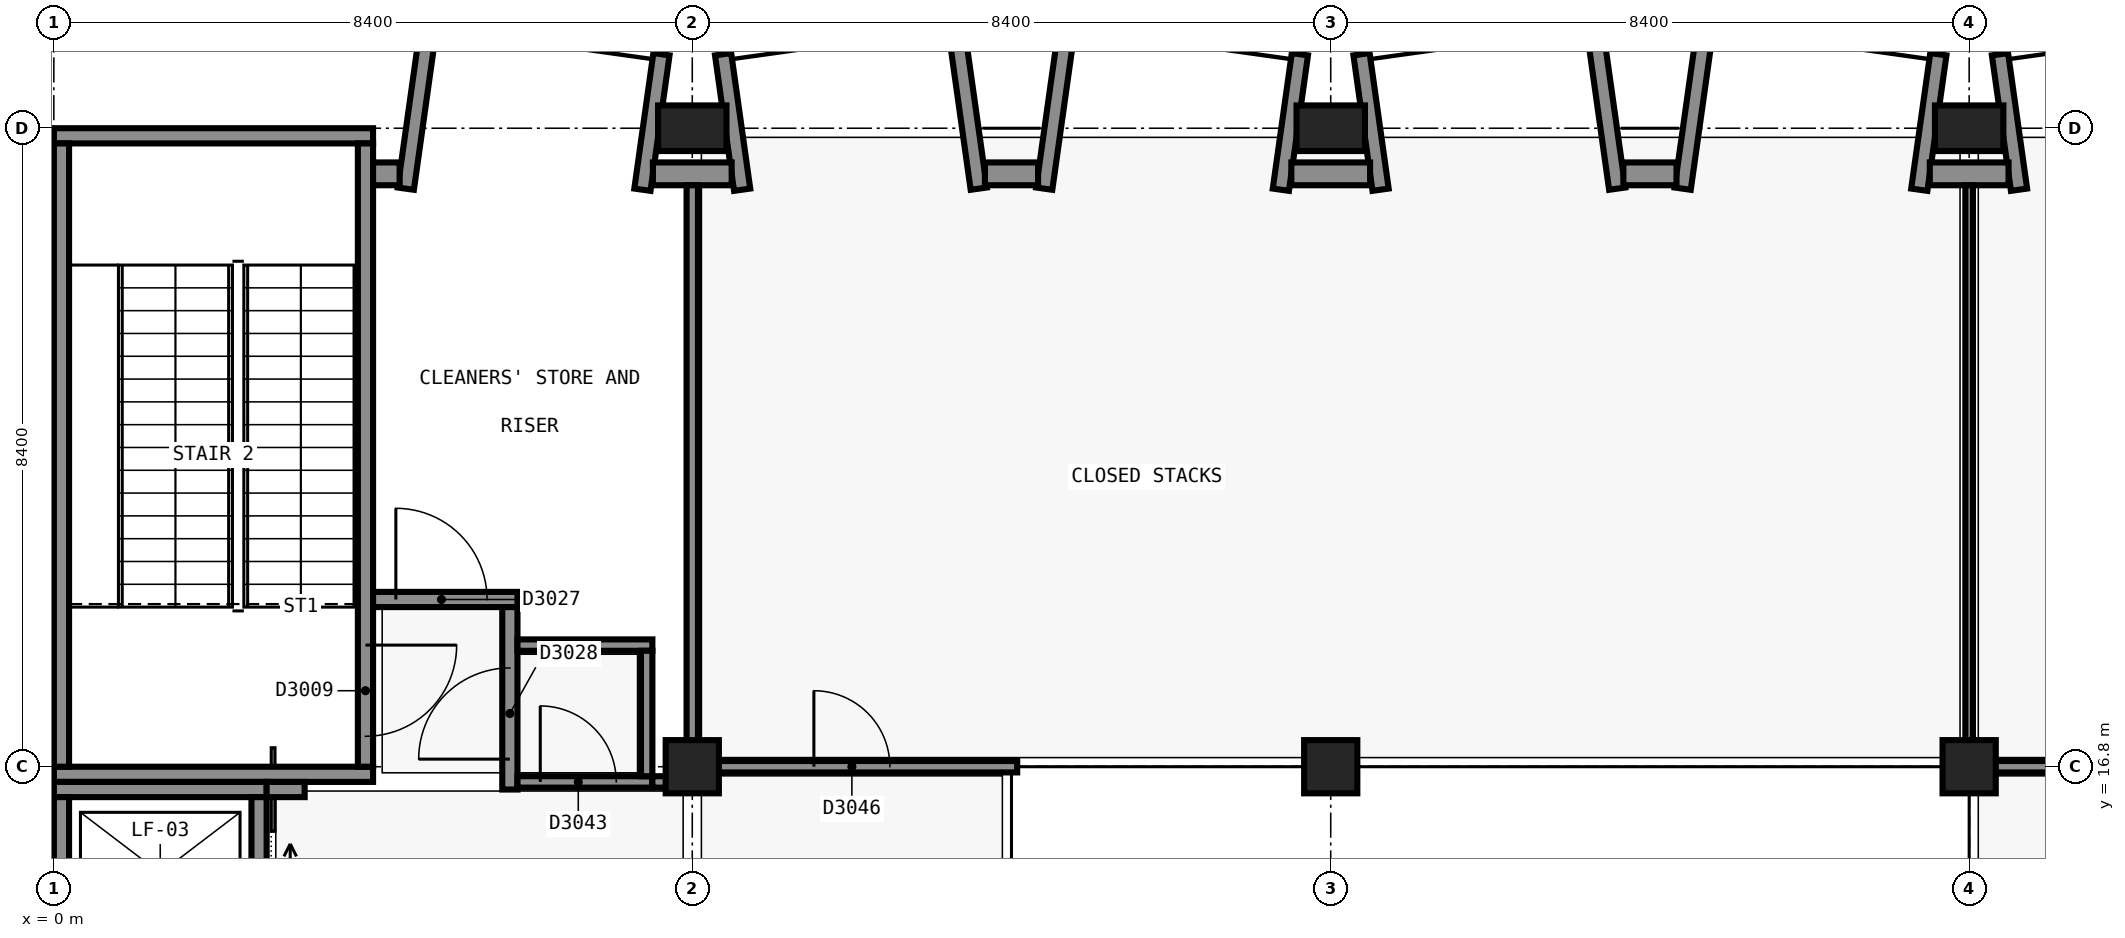
"""IFC4 building model, lengths in metres.
Left out: names, types, materials, properties, quantities, classifications, styles, units other than length and angle.
Written with IfcOpenShell. Run it as: python <this file> out.ifc"""

import sys

from ifc_helpers import new_model, si_unit, direction, frame, frame_2d, origin, origin_2d, place, context, subcontext, project, spatial, rectangle, extrude, element, fill, save


model = new_model("IFC4")
c1 = context("Model", 3, precision=1e-05, world=origin(), true_north=direction((0.0, 1.0)))
c2 = subcontext(c1, "Body", "Model", "MODEL_VIEW")
j1 = project(units=[si_unit("LENGTHUNIT", "METRE"), si_unit("PLANEANGLEUNIT", "RADIAN")], contexts=[c1])
p1 = place(None, origin())
s1 = spatial("IfcSite", under=j1, at=p1, CompositionType="ELEMENT")
p2 = place(p1, origin())
s2 = spatial("IfcBuilding", under=s1, at=p2, CompositionType="ELEMENT")
p3 = place(p2, frame((0.0, 0.0, 15.0)))
s3 = spatial("IfcBuildingStorey", under=s2, at=p3, CompositionType="ELEMENT", Elevation=15.0)
for number, where, z_axis, x_axis in (
    (1, (4.2, 16.7, 0.0), (0.0, 0.0, 1.0), (-1.0, 0.0, 0.0)),
    (2, (0.0, 25.1, 0.0), (0.0, 0.0, 1.0), (1.0, 0.0, 0.0)),
):
    element("IfcWall", number, at=place(p3, frame(where, z_axis=z_axis, x_axis=x_axis)), inside=s3, PredefinedType="SHEAR", context=c2, shape_type="SweptSolid", body=[
        extrude(rectangle(XDim=4.199, YDim=0.2, at=frame_2d((2.1, 0.0))), origin(), (0.0, 0.0, 1.0), 4.8),
    ])
p4 = place(p3, frame((0.1, 16.8, 0.0), z_axis=(0.0, 0.0, 1.0), x_axis=(0.0, 1.0, 0.0)))
e3 = element("IfcWall", 3, at=p4, inside=s3, PredefinedType="SHEAR", context=c2, shape_type="SweptSolid", body=[
    extrude(rectangle(XDim=8.2, YDim=0.2, at=frame_2d((4.1, 0.0))), origin(), (0.0, 0.0, 1.0), 4.8),
])
p5 = place(p3, frame((4.1, 25.0, 0.0), z_axis=(0.0, 0.0, 1.0), x_axis=(0.0, -1.0, 0.0)))
e4 = element("IfcWall", 4, at=p5, inside=s3, PredefinedType="SHEAR", context=c2, shape_type="SweptSolid", body=[
    extrude(rectangle(XDim=8.2, YDim=0.2, at=frame_2d((4.1, 0.0))), origin(), (0.0, 0.0, 1.0), 4.8),
])
p6 = place(p5, frame((6.6, 0.0, 0.0)))
e5 = element("IfcOpeningElement", 5, at=p6, cuts=e4, PredefinedType="OPENING", context=c2, shape_type="SweptSolid", body=[
    extrude(rectangle(XDim=1.2, YDim=2.1, at=frame_2d((0.6, 1.05))), frame((0.0, 0.11, 0.0), z_axis=(0.0, -1.0, 0.0), x_axis=(1.0, 0.0, 0.0)), (0.0, 0.0, 1.0), 0.22),
])
p7 = place(p3, frame((0.0, 16.5, 0.0), z_axis=(0.0, 0.0, 1.0), x_axis=(1.0, 0.0, 0.0)))
e6 = element("IfcWall", 6, at=p7, inside=s3, PredefinedType="SHEAR", context=c2, shape_type="SweptSolid", body=[
    extrude(rectangle(XDim=2.8, YDim=0.2, at=frame_2d((1.4, 0.0))), origin(), (0.0, 0.0, 1.0), 4.8),
])
p8 = place(p3, frame((0.1, 14.3, 0.0), z_axis=(0.0, 0.0, 1.0), x_axis=(0.0, 1.0, 0.0)))
e7 = element("IfcWall", 7, at=p8, inside=s3, PredefinedType="SHEAR", context=c2, shape_type="SweptSolid", body=[
    extrude(rectangle(XDim=2.1, YDim=0.2, at=frame_2d((1.05, 0.0))), origin(), (0.0, 0.0, 1.0), 4.8),
])
p9 = place(p3, frame((2.7, 16.4, 0.0), z_axis=(0.0, 0.0, 1.0), x_axis=(0.0, -1.0, 0.0)))
e8 = element("IfcWall", 8, at=p9, inside=s3, PredefinedType="SHEAR", context=c2, shape_type="SweptSolid", body=[
    extrude(rectangle(XDim=2.1, YDim=0.2, at=frame_2d((1.05, 0.0))), origin(), (0.0, 0.0, 1.0), 4.8),
])
p10 = place(p9, frame((0.45, 0.0, 0.0)))
e9 = element("IfcOpeningElement", 9, at=p10, cuts=e8, PredefinedType="OPENING", context=c2, shape_type="SweptSolid", body=[
    extrude(rectangle(XDim=1.1, YDim=2.1, at=frame_2d((0.55, 1.05))), frame((0.0, 0.11, 0.0), z_axis=(0.0, -1.0, 0.0), x_axis=(1.0, 0.0, 0.0)), (0.0, 0.0, 1.0), 0.22),
])
p11 = place(p3, frame((8.4, 16.8, 0.0), z_axis=(0.0, 0.0, 1.0), x_axis=(1.0, 0.0, 0.0)))
e10 = element("IfcColumn", 10, at=p11, inside=s3, PredefinedType="COLUMN", context=c2, shape_type="SweptSolid", body=[
    extrude(rectangle(XDim=0.7, YDim=0.7, at=origin_2d()), origin(), (0.0, 0.0, 1.0), 4.8),
])
p12 = place(p3, frame((8.4, 25.2, 0.0), z_axis=(0.0, 0.0, 1.0), x_axis=(1.0, 0.0, 0.0)))
e11 = element("IfcColumn", 11, at=p12, inside=s3, PredefinedType="COLUMN", context=c2, shape_type="SweptSolid", body=[
    extrude(rectangle(XDim=0.9, YDim=0.6, at=origin_2d()), origin(), (0.0, 0.0, 1.0), 4.8),
])
p13 = place(p3, frame((16.8, 16.8, 0.0), z_axis=(0.0, 0.0, 1.0), x_axis=(1.0, 0.0, 0.0)))
e12 = element("IfcColumn", 12, at=p13, inside=s3, PredefinedType="COLUMN", context=c2, shape_type="SweptSolid", body=[
    extrude(rectangle(XDim=0.7, YDim=0.7, at=origin_2d()), origin(), (0.0, 0.0, 1.0), 4.8),
])
p14 = place(p3, frame((16.8, 25.2, 0.0), z_axis=(0.0, 0.0, 1.0), x_axis=(1.0, 0.0, 0.0)))
e13 = element("IfcColumn", 13, at=p14, inside=s3, PredefinedType="COLUMN", context=c2, shape_type="SweptSolid", body=[
    extrude(rectangle(XDim=0.9, YDim=0.6, at=origin_2d()), origin(), (0.0, 0.0, 1.0), 4.8),
])
p15 = place(p3, frame((25.2, 16.8, 0.0), z_axis=(0.0, 0.0, 1.0), x_axis=(1.0, 0.0, 0.0)))
e14 = element("IfcColumn", 14, at=p15, inside=s3, PredefinedType="COLUMN", context=c2, shape_type="SweptSolid", body=[
    extrude(rectangle(XDim=0.7, YDim=0.7, at=origin_2d()), origin(), (0.0, 0.0, 1.0), 4.8),
])
p16 = place(p3, frame((25.2, 25.2, 0.0), z_axis=(0.0, 0.0, 1.0), x_axis=(1.0, 0.0, 0.0)))
e15 = element("IfcColumn", 15, at=p16, inside=s3, PredefinedType="COLUMN", context=c2, shape_type="SweptSolid", body=[
    extrude(rectangle(XDim=0.9, YDim=0.6, at=origin_2d()), origin(), (0.0, 0.0, 1.0), 4.8),
])
p17 = place(p3, frame((2.8, 16.5, 0.0), z_axis=(0.0, 0.0, 1.0), x_axis=(1.0, 0.0, 0.0)))
e16 = element("IfcWall", 16, at=p17, inside=s3, PredefinedType="SHEAR", context=c2, shape_type="SweptSolid", body=[
    extrude(rectangle(XDim=0.5, YDim=0.2, at=frame_2d((0.25, 0.0))), origin(), (0.0, 0.0, 1.0), 4.8),
])
p18 = place(p3, frame((4.631, 24.405, 0.0), z_axis=(0.0, 0.0, 1.0), x_axis=(0.139141913905, 0.990272451295, 0.0)))
e17 = element("IfcWall", 17, at=p18, inside=s3, PredefinedType="SOLIDWALL", context=c2, shape_type="SweptSolid", body=[
    extrude(rectangle(XDim=2.219, YDim=0.215, at=frame_2d((1.11, 0.0))), origin(), (0.0, 0.0, 1.0), 4.5),
])
for number, where, z_axis, x_axis in (
    (18, (7.744, 24.391, 0.0), (0.0, 0.0, 1.0), (0.139, 0.99, 0.0)),
    (19, (9.056, 24.391, 0.0), (0.0, 0.0, 1.0), (-0.139, 0.99, 0.0)),
):
    element("IfcWall", number, at=place(p3, frame(where, z_axis=z_axis, x_axis=x_axis)), inside=s3, PredefinedType="SOLIDWALL", context=c2, shape_type="SweptSolid", body=[
        extrude(rectangle(XDim=1.8, YDim=0.215, at=frame_2d((0.9, 0.0))), origin(), (0.0, 0.0, 1.0), 4.5),
    ])
p19 = place(p3, frame((12.169, 24.405, 0.0), z_axis=(0.0, 0.0, 1.0), x_axis=(-0.139141913905, 0.990272451295, 0.0)))
e20 = element("IfcWall", 20, at=p19, inside=s3, PredefinedType="SOLIDWALL", context=c2, shape_type="SweptSolid", body=[
    extrude(rectangle(XDim=2.219, YDim=0.215, at=frame_2d((1.11, 0.0))), origin(), (0.0, 0.0, 1.0), 4.5),
])
p20 = place(p3, frame((13.031, 24.405, 0.0), z_axis=(0.0, 0.0, 1.0), x_axis=(0.139249775508, 0.99025728981, 0.0)))
e21 = element("IfcWall", 21, at=p20, inside=s3, PredefinedType="SOLIDWALL", context=c2, shape_type="SweptSolid", body=[
    extrude(rectangle(XDim=2.22, YDim=0.215, at=frame_2d((1.11, 0.0))), origin(), (0.0, 0.0, 1.0), 4.5),
])
for number, where, z_axis, x_axis in (
    (22, (16.144, 24.391, 0.0), (0.0, 0.0, 1.0), (0.139, 0.99, 0.0)),
    (23, (17.456, 24.391, 0.0), (0.0, 0.0, 1.0), (-0.139, 0.99, 0.0)),
):
    element("IfcWall", number, at=place(p3, frame(where, z_axis=z_axis, x_axis=x_axis)), inside=s3, PredefinedType="SOLIDWALL", context=c2, shape_type="SweptSolid", body=[
        extrude(rectangle(XDim=1.8, YDim=0.215, at=frame_2d((0.9, 0.0))), origin(), (0.0, 0.0, 1.0), 4.5),
    ])
for number, where, z_axis, x_axis in (
    (24, (20.569, 24.405, 0.0), (0.0, 0.0, 1.0), (-0.139, 0.99, 0.0)),
    (25, (21.431, 24.405, 0.0), (0.0, 0.0, 1.0), (0.139, 0.99, 0.0)),
):
    element("IfcWall", number, at=place(p3, frame(where, z_axis=z_axis, x_axis=x_axis)), inside=s3, PredefinedType="SOLIDWALL", context=c2, shape_type="SweptSolid", body=[
        extrude(rectangle(XDim=2.219, YDim=0.215, at=frame_2d((1.11, 0.0))), origin(), (0.0, 0.0, 1.0), 4.5),
    ])
for number, where, z_axis, x_axis in (
    (26, (24.544, 24.391, 0.0), (0.0, 0.0, 1.0), (0.139, 0.99, 0.0)),
    (27, (25.856, 24.391, 0.0), (0.0, 0.0, 1.0), (-0.139, 0.99, 0.0)),
):
    element("IfcWall", number, at=place(p3, frame(where, z_axis=z_axis, x_axis=x_axis)), inside=s3, PredefinedType="SOLIDWALL", context=c2, shape_type="SweptSolid", body=[
        extrude(rectangle(XDim=1.8, YDim=0.215, at=frame_2d((0.9, 0.0))), origin(), (0.0, 0.0, 1.0), 4.5),
    ])
p21 = place(p3, frame((4.2, 24.6, 0.0), z_axis=(0.0, 0.0, 1.0), x_axis=(1.0, 0.0, 0.0)))
e28 = element("IfcWall", 28, at=p21, inside=s3, PredefinedType="SOLIDWALL", context=c2, shape_type="SweptSolid", body=[
    extrude(rectangle(XDim=0.349, YDim=0.3, at=frame_2d((0.175, 0.0))), origin(), (0.0, 0.0, 1.0), 4.5),
])
p22 = place(p3, frame((7.882, 24.6, 0.0), z_axis=(0.0, 0.0, 1.0), x_axis=(1.0, 0.0, 0.0)))
e29 = element("IfcWall", 29, at=p22, inside=s3, PredefinedType="SOLIDWALL", context=c2, shape_type="SweptSolid", body=[
    extrude(rectangle(XDim=1.036, YDim=0.3, at=frame_2d((0.518, 0.0))), origin(), (0.0, 0.0, 1.0), 4.5),
])
p23 = place(p3, frame((12.25, 24.6, 0.0), z_axis=(0.0, 0.0, 1.0), x_axis=(1.0, 0.0, 0.0)))
e30 = element("IfcWall", 30, at=p23, inside=s3, PredefinedType="SOLIDWALL", context=c2, shape_type="SweptSolid", body=[
    extrude(rectangle(XDim=0.699, YDim=0.3, at=frame_2d((0.35, 0.0))), origin(), (0.0, 0.0, 1.0), 4.5),
])
p24 = place(p3, frame((16.282, 24.6, 0.0), z_axis=(0.0, 0.0, 1.0), x_axis=(1.0, 0.0, 0.0)))
e31 = element("IfcWall", 31, at=p24, inside=s3, PredefinedType="SOLIDWALL", context=c2, shape_type="SweptSolid", body=[
    extrude(rectangle(XDim=1.036, YDim=0.3, at=frame_2d((0.518, 0.0))), origin(), (0.0, 0.0, 1.0), 4.5),
])
p25 = place(p3, frame((20.65, 24.6, 0.0), z_axis=(0.0, 0.0, 1.0), x_axis=(1.0, 0.0, 0.0)))
e32 = element("IfcWall", 32, at=p25, inside=s3, PredefinedType="SOLIDWALL", context=c2, shape_type="SweptSolid", body=[
    extrude(rectangle(XDim=0.699, YDim=0.3, at=frame_2d((0.35, 0.0))), origin(), (0.0, 0.0, 1.0), 4.5),
])
p26 = place(p3, frame((24.682, 24.6, 0.0), z_axis=(0.0, 0.0, 1.0), x_axis=(1.0, 0.0, 0.0)))
e33 = element("IfcWall", 33, at=p26, inside=s3, PredefinedType="SOLIDWALL", context=c2, shape_type="SweptSolid", body=[
    extrude(rectangle(XDim=1.036, YDim=0.3, at=frame_2d((0.518, 0.0))), origin(), (0.0, 0.0, 1.0), 4.5),
])
p27 = place(p3, frame((4.2, 19.0, 0.0), z_axis=(0.0, 0.0, 1.0), x_axis=(1.0, 0.0, 0.0)))
e34 = element("IfcWall", 34, at=p27, inside=s3, PredefinedType="SOLIDWALL", context=c2, shape_type="SweptSolid", body=[
    extrude(rectangle(XDim=1.9, YDim=0.2, at=frame_2d((0.95, 0.0))), origin(), (0.0, 0.0, 1.0), 4.5),
])
p28 = place(p27, frame((0.3, 0.0, 0.0)))
e35 = element("IfcOpeningElement", 35, at=p28, cuts=e34, PredefinedType="OPENING", context=c2, shape_type="SweptSolid", body=[
    extrude(rectangle(XDim=1.2, YDim=2.1, at=frame_2d((0.6, 1.05))), frame((0.0, 0.11, 0.0), z_axis=(0.0, -1.0, 0.0), x_axis=(1.0, 0.0, 0.0)), (0.0, 0.0, 1.0), 0.22),
])
p29 = place(p3, frame((6.0, 16.5, 0.0), z_axis=(0.0, 0.0, 1.0), x_axis=(0.0, 1.0, 0.0)))
e36 = element("IfcWall", 36, at=p29, inside=s3, PredefinedType="SOLIDWALL", context=c2, shape_type="SweptSolid", body=[
    extrude(rectangle(XDim=2.4, YDim=0.2, at=frame_2d((1.2, 0.0))), origin(), (0.0, 0.0, 1.0), 4.0),
])
p30 = place(p29, frame((0.4, 0.0, 0.0)))
e37 = element("IfcOpeningElement", 37, at=p30, cuts=e36, PredefinedType="OPENING", context=c2, shape_type="SweptSolid", body=[
    extrude(rectangle(XDim=1.2, YDim=2.1, at=frame_2d((0.6, 1.05))), frame((0.0, 0.11, 0.0), z_axis=(0.0, -1.0, 0.0), x_axis=(1.0, 0.0, 0.0)), (0.0, 0.0, 1.0), 0.22),
])
p31 = place(p3, frame((6.1, 16.6, 0.0), z_axis=(0.0, 0.0, 1.0), x_axis=(1.0, 0.0, 0.0)))
e38 = element("IfcWall", 38, at=p31, inside=s3, PredefinedType="PARTITIONING", context=c2, shape_type="SweptSolid", body=[
    extrude(rectangle(XDim=1.775, YDim=0.15, at=frame_2d((0.887, 0.0))), origin(), (0.0, 0.0, 1.0), 4.0),
])
p32 = place(p31, frame((0.3, 0.0, 0.0)))
e39 = element("IfcOpeningElement", 39, at=p32, cuts=e38, PredefinedType="OPENING", context=c2, shape_type="SweptSolid", body=[
    extrude(rectangle(XDim=1.0, YDim=2.1, at=frame_2d((0.5, 1.05))), frame((0.0, 0.085, 0.0), z_axis=(0.0, -1.0, 0.0), x_axis=(1.0, 0.0, 0.0)), (0.0, 0.0, 1.0), 0.17),
])
p33 = place(p3, frame((8.325, 16.8, 0.0), z_axis=(0.0, 0.0, 1.0), x_axis=(1.0, 0.0, 0.0)))
e40 = element("IfcWall", 40, at=p33, inside=s3, PredefinedType="PARTITIONING", context=c2, shape_type="SweptSolid", body=[
    extrude(rectangle(XDim=4.35, YDim=0.15, at=frame_2d((2.175, 0.0))), origin(), (0.0, 0.0, 1.0), 3.8),
])
p34 = place(p33, frame((1.675, 0.0, 0.0)))
e41 = element("IfcOpeningElement", 41, at=p34, cuts=e40, PredefinedType="OPENING", context=c2, shape_type="SweptSolid", body=[
    extrude(rectangle(XDim=1.0, YDim=2.1, at=frame_2d((0.5, 1.05))), frame((0.0, 0.085, 0.0), z_axis=(0.0, -1.0, 0.0), x_axis=(1.0, 0.0, 0.0)), (0.0, 0.0, 1.0), 0.17),
])
p35 = place(p3, frame((25.125, 16.8, 0.0), z_axis=(0.0, 0.0, 1.0), x_axis=(1.0, 0.0, 0.0)))
e42 = element("IfcWall", 42, at=p35, inside=s3, PredefinedType="PARTITIONING", context=c2, shape_type="SweptSolid", body=[
    extrude(rectangle(XDim=7.575, YDim=0.15, at=frame_2d((3.788, 0.0))), origin(), (0.0, 0.0, 1.0), 3.8),
])
p36 = place(p35, frame((3.775, 0.0, 0.0)))
e43 = element("IfcOpeningElement", 43, at=p36, cuts=e42, PredefinedType="OPENING", context=c2, shape_type="SweptSolid", body=[
    extrude(rectangle(XDim=1.0, YDim=2.1, at=frame_2d((0.5, 1.05))), frame((0.0, 0.085, 0.0), z_axis=(0.0, -1.0, 0.0), x_axis=(1.0, 0.0, 0.0)), (0.0, 0.0, 1.0), 0.17),
])
p37 = place(p3, frame((7.875, 16.6, 0.0), z_axis=(0.0, 0.0, 1.0), x_axis=(1.0, 0.0, 0.0)))
e44 = element("IfcWall", 44, at=p37, inside=s3, PredefinedType="SOLIDWALL", context=c2, shape_type="SweptSolid", body=[
    extrude(rectangle(XDim=0.6, YDim=0.15, at=frame_2d((0.3, 0.0))), origin(), (0.0, 0.0, 1.0), 3.8),
])
p38 = place(p3, frame((6.1, 18.4, 0.0), z_axis=(0.0, 0.0, 1.0), x_axis=(1.0, 0.0, 0.0)))
e45 = element("IfcWall", 45, at=p38, inside=s3, PredefinedType="SOLIDWALL", context=c2, shape_type="SweptSolid", body=[
    extrude(rectangle(XDim=1.775, YDim=0.15, at=frame_2d((0.887, 0.0))), origin(), (0.0, 0.0, 1.0), 4.5),
])
p39 = place(p3, frame((7.8, 16.675, 0.0), z_axis=(0.0, 0.0, 1.0), x_axis=(0.0, 1.0, 0.0)))
e46 = element("IfcWall", 46, at=p39, inside=s3, PredefinedType="SOLIDWALL", context=c2, shape_type="SweptSolid", body=[
    extrude(rectangle(XDim=1.65, YDim=0.15, at=frame_2d((0.825, 0.0))), origin(), (0.0, 0.0, 1.0), 4.0),
])
p40 = place(p3, frame((8.4, 16.875, 0.0), z_axis=(0.0, 0.0, 1.0), x_axis=(0.0, 1.0, 0.0)))
e47 = element("IfcWall", 47, at=p40, inside=s3, PredefinedType="SOLIDWALL", context=c2, shape_type="SweptSolid", body=[
    extrude(rectangle(XDim=7.575, YDim=0.15, at=frame_2d((3.788, 0.0))), origin(), (0.0, 0.0, 1.0), 3.8),
])
p41 = place(p3, frame((25.2, 16.875, 0.0), z_axis=(0.0, 0.0, 1.0), x_axis=(0.0, 1.0, 0.0)))
e48 = element("IfcWall", 48, at=p41, inside=s3, PredefinedType="PARTITIONING", context=c2, shape_type="SweptSolid", body=[
    extrude(rectangle(XDim=7.575, YDim=0.1, at=frame_2d((3.788, 0.0))), origin(), (0.0, 0.0, 1.0), 3.8),
])
p42 = place(p10, origin())
e49 = element("IfcDoor", 49, at=p42, inside=s3, OperationType="SLIDING_TO_LEFT", PredefinedType="DOOR", context=c2, shape_type="SweptSolid", body=[
    extrude(rectangle(XDim=1.1, YDim=2.1, at=frame_2d((0.55, 1.05))), frame((0.0, 0.025, 0.0), z_axis=(0.0, -1.0, 0.0), x_axis=(1.0, 0.0, 0.0)), (0.0, 0.0, 1.0), 0.05),
])
fill(e9, e49)
p43 = place(p6, origin())
e50 = element("IfcDoor", 50, at=p43, inside=s3, OperationType="SINGLE_SWING_RIGHT", PredefinedType="DOOR", context=c2, shape_type="SweptSolid", body=[
    extrude(rectangle(XDim=1.2, YDim=2.1, at=frame_2d((0.6, 1.05))), frame((0.0, 0.025, 0.0), z_axis=(0.0, -1.0, 0.0), x_axis=(1.0, 0.0, 0.0)), (0.0, 0.0, 1.0), 0.05),
])
fill(e5, e50)
p44 = place(p28, origin())
e51 = element("IfcDoor", 51, at=p44, inside=s3, OperationType="SINGLE_SWING_LEFT", PredefinedType="DOOR", context=c2, shape_type="SweptSolid", body=[
    extrude(rectangle(XDim=1.2, YDim=2.1, at=frame_2d((0.6, 1.05))), frame((0.0, 0.025, 0.0), z_axis=(0.0, -1.0, 0.0), x_axis=(1.0, 0.0, 0.0)), (0.0, 0.0, 1.0), 0.05),
])
fill(e35, e51)
p45 = place(p30, origin())
e52 = element("IfcDoor", 52, at=p45, inside=s3, OperationType="SINGLE_SWING_RIGHT", PredefinedType="DOOR", context=c2, shape_type="SweptSolid", body=[
    extrude(rectangle(XDim=1.2, YDim=2.1, at=frame_2d((0.6, 1.05))), frame((0.0, 0.025, 0.0), z_axis=(0.0, -1.0, 0.0), x_axis=(1.0, 0.0, 0.0)), (0.0, 0.0, 1.0), 0.05),
])
fill(e37, e52)
p46 = place(p32, origin())
e53 = element("IfcDoor", 53, at=p46, inside=s3, OperationType="SINGLE_SWING_RIGHT", PredefinedType="DOOR", context=c2, shape_type="SweptSolid", body=[
    extrude(rectangle(XDim=1.0, YDim=2.1, at=frame_2d((0.5, 1.05))), frame((0.0, 0.025, 0.0), z_axis=(0.0, -1.0, 0.0), x_axis=(1.0, 0.0, 0.0)), (0.0, 0.0, 1.0), 0.05),
])
fill(e39, e53)
p47 = place(p34, origin())
e54 = element("IfcDoor", 54, at=p47, inside=s3, OperationType="SINGLE_SWING_RIGHT", PredefinedType="DOOR", context=c2, shape_type="SweptSolid", body=[
    extrude(rectangle(XDim=1.0, YDim=2.1, at=frame_2d((0.5, 1.05))), frame((0.0, 0.025, 0.0), z_axis=(0.0, -1.0, 0.0), x_axis=(1.0, 0.0, 0.0)), (0.0, 0.0, 1.0), 0.05),
])
fill(e41, e54)
save(model, sys.argv[1])
